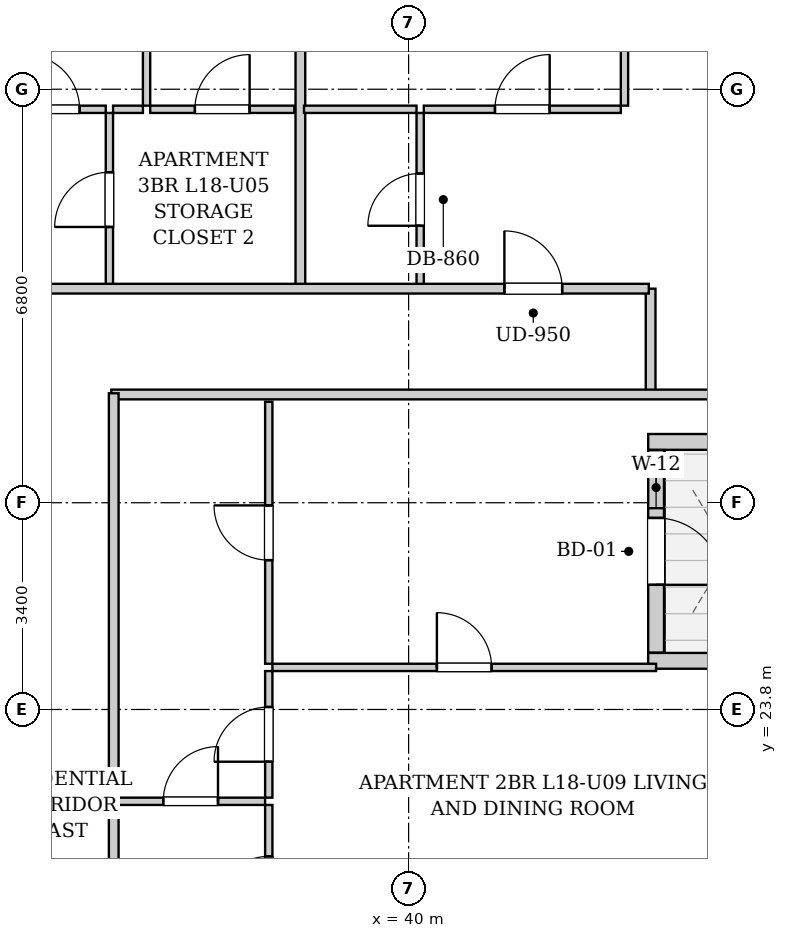
"""IFC4 building model, lengths in metres.
Left out: names, types, materials, properties, quantities, classifications, styles, units other than length and angle.
Written with IfcOpenShell. Run it as: python <this file> out.ifc"""

import sys

from ifc_helpers import new_model, si_unit, direction, frame, frame_2d, origin, place, context, subcontext, project, spatial, rectangle, extrude, element, fill, save


model = new_model("IFC4")
c1 = context("Model", 3, precision=1e-05, world=origin(), true_north=direction((0.0, 1.0)))
c2 = subcontext(c1, "Body", "Model", "MODEL_VIEW")
j1 = project(units=[si_unit("LENGTHUNIT", "METRE"), si_unit("PLANEANGLEUNIT", "RADIAN")], contexts=[c1])
p1 = place(None, origin())
s1 = spatial("IfcSite", under=j1, at=p1, CompositionType="ELEMENT")
p2 = place(p1, origin())
s2 = spatial("IfcBuilding", under=s1, at=p2, CompositionType="ELEMENT")
p3 = place(p2, frame((0.0, 0.0, 67.4)))
s3 = spatial("IfcBuildingStorey", under=s2, at=p3, CompositionType="ELEMENT", Elevation=67.4)
p4 = place(p3, frame((46.34, 28.2, 0.0), z_axis=(0.0, 0.0, 1.0), x_axis=(-1.0, 0.0, 0.0)))
e1 = element("IfcWall", 1, at=p4, inside=s3, PredefinedType="SOLIDWALL", context=c2, shape_type="SweptSolid", body=[
    extrude(rectangle(XDim=2.4, YDim=0.26, at=frame_2d((1.2, 0.0))), origin(), (0.0, 0.0, 1.0), 2.88),
])
p5 = place(p3, frame((44.07, 28.066, 0.0), z_axis=(0.0, 0.0, 1.0), x_axis=(0.0, -1.0, 0.0)))
e2 = element("IfcWall", 2, at=p5, inside=s3, PredefinedType="SOLIDWALL", context=c2, shape_type="SweptSolid", body=[
    extrude(rectangle(XDim=3.332, YDim=0.26, at=frame_2d((1.666, 0.0))), origin(), (0.0, 0.0, 1.0), 2.88),
])
p6 = place(p5, frame((1.116, 0.0, 0.0)))
e3 = element("IfcOpeningElement", 3, at=p6, cuts=e2, PredefinedType="OPENING", context=c2, shape_type="SweptSolid", body=[
    extrude(rectangle(XDim=1.1, YDim=2.0, at=frame_2d((0.55, 1.0))), frame((0.0, 0.14, 0.0), z_axis=(0.0, -1.0, 0.0), x_axis=(1.0, 0.0, 0.0)), (0.0, 0.0, 1.0), 0.28),
])
p7 = place(p5, frame((0.276, 0.0, 0.55)))
e4 = element("IfcOpeningElement", 4, at=p7, cuts=e2, PredefinedType="OPENING", context=c2, shape_type="SweptSolid", body=[
    extrude(rectangle(XDim=0.68, YDim=1.2, at=frame_2d((0.34, 0.6))), frame((0.0, 0.14, 0.0), z_axis=(0.0, -1.0, 0.0), x_axis=(1.0, 0.0, 0.0)), (0.0, 0.0, 1.0), 0.28),
])
p8 = place(p3, frame((43.94, 24.6, 0.0), z_axis=(0.0, 0.0, 1.0), x_axis=(1.0, 0.0, 0.0)))
e5 = element("IfcWall", 5, at=p8, inside=s3, PredefinedType="SOLIDWALL", context=c2, shape_type="SweptSolid", body=[
    extrude(rectangle(XDim=2.4, YDim=0.26, at=frame_2d((1.2, 0.0))), origin(), (0.0, 0.0, 1.0), 2.88),
])
p9 = place(p3, frame((43.98, 28.98, 0.0), z_axis=(0.0, 0.0, 1.0), x_axis=(0.0, 1.0, 0.0)))
e6 = element("IfcWall", 6, at=p9, inside=s3, PredefinedType="PARTITIONING", context=c2, shape_type="SweptSolid", body=[
    extrude(rectangle(XDim=1.74, YDim=0.16, at=frame_2d((0.87, 0.0))), origin(), (0.0, 0.0, 1.0), 2.88),
])
p10 = place(p3, frame((35.11, 28.98, 0.0), z_axis=(0.0, 0.0, 1.0), x_axis=(1.0, 0.0, 0.0)))
e7 = element("IfcWall", 7, at=p10, inside=s3, PredefinedType="PARTITIONING", context=c2, shape_type="SweptSolid", body=[
    extrude(rectangle(XDim=11.11, YDim=0.16, at=frame_2d((5.555, 0.0))), origin(), (0.0, 0.0, 1.0), 2.172),
])
p11 = place(p3, frame((35.079, 30.76, 0.0), z_axis=(0.0, 0.0, 1.0), x_axis=(0.0, 1.0, 0.0)))
e8 = element("IfcWall", 8, at=p11, inside=s3, PredefinedType="PARTITIONING", context=c2, shape_type="SweptSolid", body=[
    extrude(rectangle(XDim=2.85, YDim=0.12, at=frame_2d((1.425, 0.0))), origin(), (0.0, 0.0, 1.0), 2.88),
])
p12 = place(p11, frame((0.975, 0.0, 0.0)))
e9 = element("IfcOpeningElement", 9, at=p12, cuts=e8, PredefinedType="OPENING", context=c2, shape_type="SweptSolid", body=[
    extrude(rectangle(XDim=0.9, YDim=2.05, at=frame_2d((0.45, 1.025))), frame((0.0, 0.07, 0.0), z_axis=(0.0, -1.0, 0.0), x_axis=(1.0, 0.0, 0.0)), (0.0, 0.0, 1.0), 0.14),
])
p13 = place(p3, frame((33.26, 33.67, 0.0), z_axis=(0.0, 0.0, 1.0), x_axis=(1.0, 0.0, 0.0)))
e10 = element("IfcWall", 10, at=p13, inside=s3, PredefinedType="PARTITIONING", context=c2, shape_type="SweptSolid", body=[
    extrude(rectangle(XDim=1.759, YDim=0.12, at=frame_2d((0.879, 0.0))), origin(), (0.0, 0.0, 1.0), 2.88),
])
p14 = place(p13, frame((0.429, 0.0, 0.0)))
e11 = element("IfcOpeningElement", 11, at=p14, cuts=e10, PredefinedType="OPENING", context=c2, shape_type="SweptSolid", body=[
    extrude(rectangle(XDim=0.9, YDim=2.05, at=frame_2d((0.45, 1.025))), frame((0.0, 0.07, 0.0), z_axis=(0.0, -1.0, 0.0), x_axis=(1.0, 0.0, 0.0)), (0.0, 0.0, 1.0), 0.14),
])
p15 = place(p3, frame((35.139, 33.67, 0.0), z_axis=(0.0, 0.0, 1.0), x_axis=(1.0, 0.0, 0.0)))
e12 = element("IfcWall", 12, at=p15, inside=s3, PredefinedType="PARTITIONING", context=c2, shape_type="SweptSolid", body=[
    extrude(rectangle(XDim=0.491, YDim=0.12, at=frame_2d((0.246, 0.0))), origin(), (0.0, 0.0, 1.0), 2.88),
])
p16 = place(p3, frame((35.75, 33.67, 0.0), z_axis=(0.0, 0.0, 1.0), x_axis=(1.0, 0.0, 0.0)))
e13 = element("IfcWall", 13, at=p16, inside=s3, PredefinedType="PARTITIONING", context=c2, shape_type="SweptSolid", body=[
    extrude(rectangle(XDim=2.37, YDim=0.12, at=frame_2d((1.185, 0.0))), origin(), (0.0, 0.0, 1.0), 2.88),
])
p17 = place(p16, frame((0.735, 0.0, 0.0)))
e14 = element("IfcOpeningElement", 14, at=p17, cuts=e13, PredefinedType="OPENING", context=c2, shape_type="SweptSolid", body=[
    extrude(rectangle(XDim=0.9, YDim=2.05, at=frame_2d((0.45, 1.025))), frame((0.0, 0.07, 0.0), z_axis=(0.0, -1.0, 0.0), x_axis=(1.0, 0.0, 0.0)), (0.0, 0.0, 1.0), 0.14),
])
p18 = place(p3, frame((35.69, 33.73, 0.0), z_axis=(0.0, 0.0, 1.0), x_axis=(0.0, 1.0, 0.0)))
e15 = element("IfcWall", 15, at=p18, inside=s3, PredefinedType="PARTITIONING", context=c2, shape_type="SweptSolid", body=[
    extrude(rectangle(XDim=13.59, YDim=0.12, at=frame_2d((6.795, 0.0))), origin(), (0.0, 0.0, 1.0), 2.88),
])
p19 = place(p18, frame((6.33, 0.0, 0.0)))
e16 = element("IfcOpeningElement", 16, at=p19, cuts=e15, PredefinedType="OPENING", context=c2, shape_type="SweptSolid", body=[
    extrude(rectangle(XDim=0.9, YDim=2.05, at=frame_2d((0.45, 1.025))), frame((0.0, 0.07, 0.0), z_axis=(0.0, -1.0, 0.0), x_axis=(1.0, 0.0, 0.0)), (0.0, 0.0, 1.0), 0.14),
])
p20 = place(p3, frame((38.22, 30.76, 0.0), z_axis=(0.0, 0.0, 1.0), x_axis=(0.0, 1.0, 0.0)))
e17 = element("IfcWall", 17, at=p20, inside=s3, PredefinedType="PARTITIONING", context=c2, shape_type="SweptSolid", body=[
    extrude(rectangle(XDim=14.58, YDim=0.16, at=frame_2d((7.29, 0.0))), origin(), (0.0, 0.0, 1.0), 2.88),
])
p21 = place(p3, frame((40.19, 30.76, 0.0), z_axis=(0.0, 0.0, 1.0), x_axis=(0.0, 1.0, 0.0)))
e18 = element("IfcWall", 18, at=p21, inside=s3, PredefinedType="PARTITIONING", context=c2, shape_type="SweptSolid", body=[
    extrude(rectangle(XDim=2.85, YDim=0.12, at=frame_2d((1.425, 0.0))), origin(), (0.0, 0.0, 1.0), 2.88),
])
p22 = place(p21, frame((0.995, 0.0, 0.0)))
e19 = element("IfcOpeningElement", 19, at=p22, cuts=e18, PredefinedType="OPENING", context=c2, shape_type="SweptSolid", body=[
    extrude(rectangle(XDim=0.86, YDim=2.05, at=frame_2d((0.43, 1.025))), frame((0.0, 0.07, 0.0), z_axis=(0.0, -1.0, 0.0), x_axis=(1.0, 0.0, 0.0)), (0.0, 0.0, 1.0), 0.14),
])
p23 = place(p3, frame((38.28, 33.67, 0.0), z_axis=(0.0, 0.0, 1.0), x_axis=(1.0, 0.0, 0.0)))
e20 = element("IfcWall", 20, at=p23, inside=s3, PredefinedType="PARTITIONING", context=c2, shape_type="SweptSolid", body=[
    extrude(rectangle(XDim=1.85, YDim=0.12, at=frame_2d((0.925, 0.0))), origin(), (0.0, 0.0, 1.0), 2.88),
])
p24 = place(p3, frame((40.25, 33.67, 0.0), z_axis=(0.0, 0.0, 1.0), x_axis=(1.0, 0.0, 0.0)))
e21 = element("IfcWall", 21, at=p24, inside=s3, PredefinedType="PARTITIONING", context=c2, shape_type="SweptSolid", body=[
    extrude(rectangle(XDim=3.24, YDim=0.12, at=frame_2d((1.62, 0.0))), origin(), (0.0, 0.0, 1.0), 2.88),
])
p25 = place(p24, frame((1.17, 0.0, 0.0)))
e22 = element("IfcOpeningElement", 22, at=p25, cuts=e21, PredefinedType="OPENING", context=c2, shape_type="SweptSolid", body=[
    extrude(rectangle(XDim=0.9, YDim=2.05, at=frame_2d((0.45, 1.025))), frame((0.0, 0.07, 0.0), z_axis=(0.0, -1.0, 0.0), x_axis=(1.0, 0.0, 0.0)), (0.0, 0.0, 1.0), 0.14),
])
p26 = place(p3, frame((43.55, 33.73, 0.0), z_axis=(0.0, 0.0, 1.0), x_axis=(0.0, 1.0, 0.0)))
e23 = element("IfcWall", 23, at=p26, inside=s3, PredefinedType="PARTITIONING", context=c2, shape_type="SweptSolid", body=[
    extrude(rectangle(XDim=13.59, YDim=0.12, at=frame_2d((6.795, 0.0))), origin(), (0.0, 0.0, 1.0), 2.88),
])
p27 = place(p26, frame((6.33, 0.0, 0.0)))
e24 = element("IfcOpeningElement", 24, at=p27, cuts=e23, PredefinedType="OPENING", context=c2, shape_type="SweptSolid", body=[
    extrude(rectangle(XDim=0.9, YDim=2.05, at=frame_2d((0.45, 1.025))), frame((0.0, 0.07, 0.0), z_axis=(0.0, -1.0, 0.0), x_axis=(1.0, 0.0, 0.0)), (0.0, 0.0, 1.0), 0.14),
])
p28 = place(p3, frame((35.19, 22.29, 0.0), z_axis=(0.0, 0.0, 1.0), x_axis=(1.0, 0.0, 0.0)))
e25 = element("IfcWall", 25, at=p28, inside=s3, PredefinedType="PARTITIONING", context=c2, shape_type="SweptSolid", body=[
    extrude(rectangle(XDim=2.45, YDim=0.12, at=frame_2d((1.225, 0.0))), origin(), (0.0, 0.0, 1.0), 2.88),
])
p29 = place(p28, frame((0.775, 0.0, 0.0)))
e26 = element("IfcOpeningElement", 26, at=p29, cuts=e25, PredefinedType="OPENING", context=c2, shape_type="SweptSolid", body=[
    extrude(rectangle(XDim=0.9, YDim=2.05, at=frame_2d((0.45, 1.025))), frame((0.0, 0.07, 0.0), z_axis=(0.0, -1.0, 0.0), x_axis=(1.0, 0.0, 0.0)), (0.0, 0.0, 1.0), 0.14),
])
p30 = place(p3, frame((37.7, 22.35, 0.0), z_axis=(0.0, 0.0, 1.0), x_axis=(0.0, 1.0, 0.0)))
e27 = element("IfcWall", 27, at=p30, inside=s3, PredefinedType="PARTITIONING", context=c2, shape_type="SweptSolid", body=[
    extrude(rectangle(XDim=2.082, YDim=0.12, at=frame_2d((1.041, 0.0))), origin(), (0.0, 0.0, 1.0), 2.88),
])
p31 = place(p30, frame((0.591, 0.0, 0.0)))
e28 = element("IfcOpeningElement", 28, at=p31, cuts=e27, PredefinedType="OPENING", context=c2, shape_type="SweptSolid", body=[
    extrude(rectangle(XDim=0.9, YDim=2.05, at=frame_2d((0.45, 1.025))), frame((0.0, 0.07, 0.0), z_axis=(0.0, -1.0, 0.0), x_axis=(1.0, 0.0, 0.0)), (0.0, 0.0, 1.0), 0.14),
])
p32 = place(p3, frame((37.7, 24.552, 0.0), z_axis=(0.0, 0.0, 1.0), x_axis=(0.0, 1.0, 0.0)))
e29 = element("IfcWall", 29, at=p32, inside=s3, PredefinedType="PARTITIONING", context=c2, shape_type="SweptSolid", body=[
    extrude(rectangle(XDim=4.308, YDim=0.12, at=frame_2d((2.154, 0.0))), origin(), (0.0, 0.0, 1.0), 2.88),
])
p33 = place(p32, frame((1.704, 0.0, 0.0)))
e30 = element("IfcOpeningElement", 30, at=p33, cuts=e29, PredefinedType="OPENING", context=c2, shape_type="SweptSolid", body=[
    extrude(rectangle(XDim=0.9, YDim=2.05, at=frame_2d((0.45, 1.025))), frame((0.0, 0.07, 0.0), z_axis=(0.0, -1.0, 0.0), x_axis=(1.0, 0.0, 0.0)), (0.0, 0.0, 1.0), 0.14),
])
p34 = place(p3, frame((37.7, 19.638, 0.0), z_axis=(0.0, 0.0, 1.0), x_axis=(0.0, 1.0, 0.0)))
e31 = element("IfcWall", 31, at=p34, inside=s3, PredefinedType="PARTITIONING", context=c2, shape_type="SweptSolid", body=[
    extrude(rectangle(XDim=2.592, YDim=0.12, at=frame_2d((1.296, 0.0))), origin(), (0.0, 0.0, 1.0), 2.88),
])
p35 = place(p34, frame((0.846, 0.0, 0.0)))
e32 = element("IfcOpeningElement", 32, at=p35, cuts=e31, PredefinedType="OPENING", context=c2, shape_type="SweptSolid", body=[
    extrude(rectangle(XDim=0.9, YDim=2.05, at=frame_2d((0.45, 1.025))), frame((0.0, 0.07, 0.0), z_axis=(0.0, -1.0, 0.0), x_axis=(1.0, 0.0, 0.0)), (0.0, 0.0, 1.0), 0.14),
])
p36 = place(p3, frame((37.76, 24.492, 0.0), z_axis=(0.0, 0.0, 1.0), x_axis=(1.0, 0.0, 0.0)))
e33 = element("IfcWall", 33, at=p36, inside=s3, PredefinedType="PARTITIONING", context=c2, shape_type="SweptSolid", body=[
    extrude(rectangle(XDim=6.31, YDim=0.12, at=frame_2d((3.155, 0.0))), origin(), (0.0, 0.0, 1.0), 2.448),
])
p37 = place(p36, frame((2.705, 0.0, 0.0)))
e34 = element("IfcOpeningElement", 34, at=p37, cuts=e33, PredefinedType="OPENING", context=c2, shape_type="SweptSolid", body=[
    extrude(rectangle(XDim=0.9, YDim=2.05, at=frame_2d((0.45, 1.025))), frame((0.0, 0.07, 0.0), z_axis=(0.0, -1.0, 0.0), x_axis=(1.0, 0.0, 0.0)), (0.0, 0.0, 1.0), 0.14),
])
p38 = place(p3, frame((10.05, 30.72, 0.0), z_axis=(0.0, 0.0, 1.0), x_axis=(1.0, 0.0, 0.0)))
e35 = element("IfcWall", 35, at=p38, inside=s3, PredefinedType="PARTITIONING", context=c2, shape_type="SweptSolid", body=[
    extrude(rectangle(XDim=33.9, YDim=0.16, at=frame_2d((16.95, 0.0))), origin(), (0.0, 0.0, 1.0), 2.88),
])
p39 = place(p38, frame((3.8, 0.0, 0.0)))
e36 = element("IfcOpeningElement", 36, at=p39, cuts=e35, PredefinedType="OPENING", context=c2, shape_type="SweptSolid", body=[
    extrude(rectangle(XDim=0.95, YDim=2.1, at=frame_2d((0.475, 1.05))), frame((0.0, 0.09, 0.0), z_axis=(0.0, -1.0, 0.0), x_axis=(1.0, 0.0, 0.0)), (0.0, 0.0, 1.0), 0.18),
])
p40 = place(p38, frame((11.977, 0.0, 0.0)))
e37 = element("IfcOpeningElement", 37, at=p40, cuts=e35, PredefinedType="OPENING", context=c2, shape_type="SweptSolid", body=[
    extrude(rectangle(XDim=0.95, YDim=2.1, at=frame_2d((0.475, 1.05))), frame((0.0, 0.09, 0.0), z_axis=(0.0, -1.0, 0.0), x_axis=(1.0, 0.0, 0.0)), (0.0, 0.0, 1.0), 0.18),
])
p41 = place(p38, frame((18.09, 0.0, 0.0)))
e38 = element("IfcOpeningElement", 38, at=p41, cuts=e35, PredefinedType="OPENING", context=c2, shape_type="SweptSolid", body=[
    extrude(rectangle(XDim=0.95, YDim=2.1, at=frame_2d((0.475, 1.05))), frame((0.0, 0.09, 0.0), z_axis=(0.0, -1.0, 0.0), x_axis=(1.0, 0.0, 0.0)), (0.0, 0.0, 1.0), 0.18),
])
p42 = place(p38, frame((31.525, 0.0, 0.0)))
e39 = element("IfcOpeningElement", 39, at=p42, cuts=e35, PredefinedType="OPENING", context=c2, shape_type="SweptSolid", body=[
    extrude(rectangle(XDim=0.95, YDim=2.1, at=frame_2d((0.475, 1.05))), frame((0.0, 0.09, 0.0), z_axis=(0.0, -1.0, 0.0), x_axis=(1.0, 0.0, 0.0)), (0.0, 0.0, 1.0), 0.18),
])
p43 = place(p3, frame((35.15, 15.07, 0.0), z_axis=(0.0, 0.0, 1.0), x_axis=(0.0, 1.0, 0.0)))
e40 = element("IfcWall", 40, at=p43, inside=s3, PredefinedType="PARTITIONING", context=c2, shape_type="SweptSolid", body=[
    extrude(rectangle(XDim=13.93, YDim=0.16, at=frame_2d((6.965, 0.0))), origin(), (0.0, 0.0, 1.0), 2.88),
])
p44 = place(p43, frame((4.385, 0.0, 0.0)))
e41 = element("IfcOpeningElement", 41, at=p44, cuts=e40, PredefinedType="OPENING", context=c2, shape_type="SweptSolid", body=[
    extrude(rectangle(XDim=0.95, YDim=2.1, at=frame_2d((0.475, 1.05))), frame((0.0, 0.09, 0.0), z_axis=(0.0, -1.0, 0.0), x_axis=(1.0, 0.0, 0.0)), (0.0, 0.0, 1.0), 0.18),
])
p45 = place(p12, origin())
e42 = element("IfcDoor", 42, at=p45, inside=s3, OperationType="SINGLE_SWING_LEFT", PredefinedType="DOOR", context=c2, shape_type="SweptSolid", body=[
    extrude(rectangle(XDim=0.9, YDim=2.05, at=frame_2d((0.45, 1.025))), frame((0.0, 0.025, 0.0), z_axis=(0.0, -1.0, 0.0), x_axis=(1.0, 0.0, 0.0)), (0.0, 0.0, 1.0), 0.05),
])
fill(e9, e42)
p46 = place(p14, origin())
e43 = element("IfcDoor", 43, at=p46, inside=s3, OperationType="SINGLE_SWING_LEFT", PredefinedType="DOOR", context=c2, shape_type="SweptSolid", body=[
    extrude(rectangle(XDim=0.9, YDim=2.05, at=frame_2d((0.45, 1.025))), frame((0.0, 0.025, 0.0), z_axis=(0.0, -1.0, 0.0), x_axis=(1.0, 0.0, 0.0)), (0.0, 0.0, 1.0), 0.05),
])
fill(e11, e43)
p47 = place(p17, origin())
e44 = element("IfcDoor", 44, at=p47, inside=s3, OperationType="SINGLE_SWING_RIGHT", PredefinedType="DOOR", context=c2, shape_type="SweptSolid", body=[
    extrude(rectangle(XDim=0.9, YDim=2.05, at=frame_2d((0.45, 1.025))), frame((0.0, 0.025, 0.0), z_axis=(0.0, -1.0, 0.0), x_axis=(1.0, 0.0, 0.0)), (0.0, 0.0, 1.0), 0.05),
])
fill(e14, e44)
p48 = place(p22, origin())
e45 = element("IfcDoor", 45, at=p48, inside=s3, OperationType="SINGLE_SWING_LEFT", PredefinedType="DOOR", context=c2, shape_type="SweptSolid", body=[
    extrude(rectangle(XDim=0.86, YDim=2.05, at=frame_2d((0.43, 1.025))), frame((0.0, 0.025, 0.0), z_axis=(0.0, -1.0, 0.0), x_axis=(1.0, 0.0, 0.0)), (0.0, 0.0, 1.0), 0.05),
])
fill(e19, e45)
p49 = place(p25, origin())
e46 = element("IfcDoor", 46, at=p49, inside=s3, OperationType="SINGLE_SWING_RIGHT", PredefinedType="DOOR", context=c2, shape_type="SweptSolid", body=[
    extrude(rectangle(XDim=0.9, YDim=2.05, at=frame_2d((0.45, 1.025))), frame((0.0, 0.025, 0.0), z_axis=(0.0, -1.0, 0.0), x_axis=(1.0, 0.0, 0.0)), (0.0, 0.0, 1.0), 0.05),
])
fill(e22, e46)
p50 = place(p29, origin())
e47 = element("IfcDoor", 47, at=p50, inside=s3, OperationType="SINGLE_SWING_RIGHT", PredefinedType="DOOR", context=c2, shape_type="SweptSolid", body=[
    extrude(rectangle(XDim=0.9, YDim=2.05, at=frame_2d((0.45, 1.025))), frame((0.0, 0.025, 0.0), z_axis=(0.0, -1.0, 0.0), x_axis=(1.0, 0.0, 0.0)), (0.0, 0.0, 1.0), 0.05),
])
fill(e26, e47)
p51 = place(p31, origin())
e48 = element("IfcDoor", 48, at=p51, inside=s3, OperationType="SINGLE_SWING_LEFT", PredefinedType="DOOR", context=c2, shape_type="SweptSolid", body=[
    extrude(rectangle(XDim=0.9, YDim=2.05, at=frame_2d((0.45, 1.025))), frame((0.0, 0.025, 0.0), z_axis=(0.0, -1.0, 0.0), x_axis=(1.0, 0.0, 0.0)), (0.0, 0.0, 1.0), 0.05),
])
fill(e28, e48)
p52 = place(p33, origin())
e49 = element("IfcDoor", 49, at=p52, inside=s3, OperationType="SINGLE_SWING_RIGHT", PredefinedType="DOOR", context=c2, shape_type="SweptSolid", body=[
    extrude(rectangle(XDim=0.9, YDim=2.05, at=frame_2d((0.45, 1.025))), frame((0.0, 0.025, 0.0), z_axis=(0.0, -1.0, 0.0), x_axis=(1.0, 0.0, 0.0)), (0.0, 0.0, 1.0), 0.05),
])
fill(e30, e49)
p53 = place(p35, origin())
e50 = element("IfcDoor", 50, at=p53, inside=s3, OperationType="SINGLE_SWING_LEFT", PredefinedType="DOOR", context=c2, shape_type="SweptSolid", body=[
    extrude(rectangle(XDim=0.9, YDim=2.05, at=frame_2d((0.45, 1.025))), frame((0.0, 0.025, 0.0), z_axis=(0.0, -1.0, 0.0), x_axis=(1.0, 0.0, 0.0)), (0.0, 0.0, 1.0), 0.05),
])
fill(e32, e50)
p54 = place(p37, origin())
e51 = element("IfcDoor", 51, at=p54, inside=s3, OperationType="SINGLE_SWING_LEFT", PredefinedType="DOOR", context=c2, shape_type="SweptSolid", body=[
    extrude(rectangle(XDim=0.9, YDim=2.05, at=frame_2d((0.45, 1.025))), frame((0.0, 0.025, 0.0), z_axis=(0.0, -1.0, 0.0), x_axis=(1.0, 0.0, 0.0)), (0.0, 0.0, 1.0), 0.05),
])
fill(e34, e51)
p55 = place(p42, origin())
e52 = element("IfcDoor", 52, at=p55, inside=s3, OperationType="SINGLE_SWING_LEFT", PredefinedType="DOOR", context=c2, shape_type="SweptSolid", body=[
    extrude(rectangle(XDim=0.95, YDim=2.1, at=frame_2d((0.475, 1.05))), frame((0.0, 0.025, 0.0), z_axis=(0.0, -1.0, 0.0), x_axis=(1.0, 0.0, 0.0)), (0.0, 0.0, 1.0), 0.05),
])
fill(e39, e52)
p56 = place(p6, origin())
e53 = element("IfcDoor", 53, at=p56, inside=s3, OperationType="SINGLE_SWING_RIGHT", PredefinedType="DOOR", context=c2, shape_type="SweptSolid", body=[
    extrude(rectangle(XDim=1.1, YDim=2.0, at=frame_2d((0.55, 1.0))), frame((0.0, 0.025, 0.0), z_axis=(0.0, -1.0, 0.0), x_axis=(1.0, 0.0, 0.0)), (0.0, 0.0, 1.0), 0.05),
])
fill(e3, e53)
p57 = place(p7, origin())
e54 = element("IfcWindow", 54, at=p57, inside=s3, PartitioningType="SINGLE_PANEL", PredefinedType="WINDOW", context=c2, shape_type="SweptSolid", body=[
    extrude(rectangle(XDim=0.68, YDim=1.2, at=frame_2d((0.34, 0.6))), frame((0.0, 0.03, 0.0), z_axis=(0.0, -1.0, 0.0), x_axis=(1.0, 0.0, 0.0)), (0.0, 0.0, 1.0), 0.06),
])
fill(e4, e54)
save(model, sys.argv[1])
